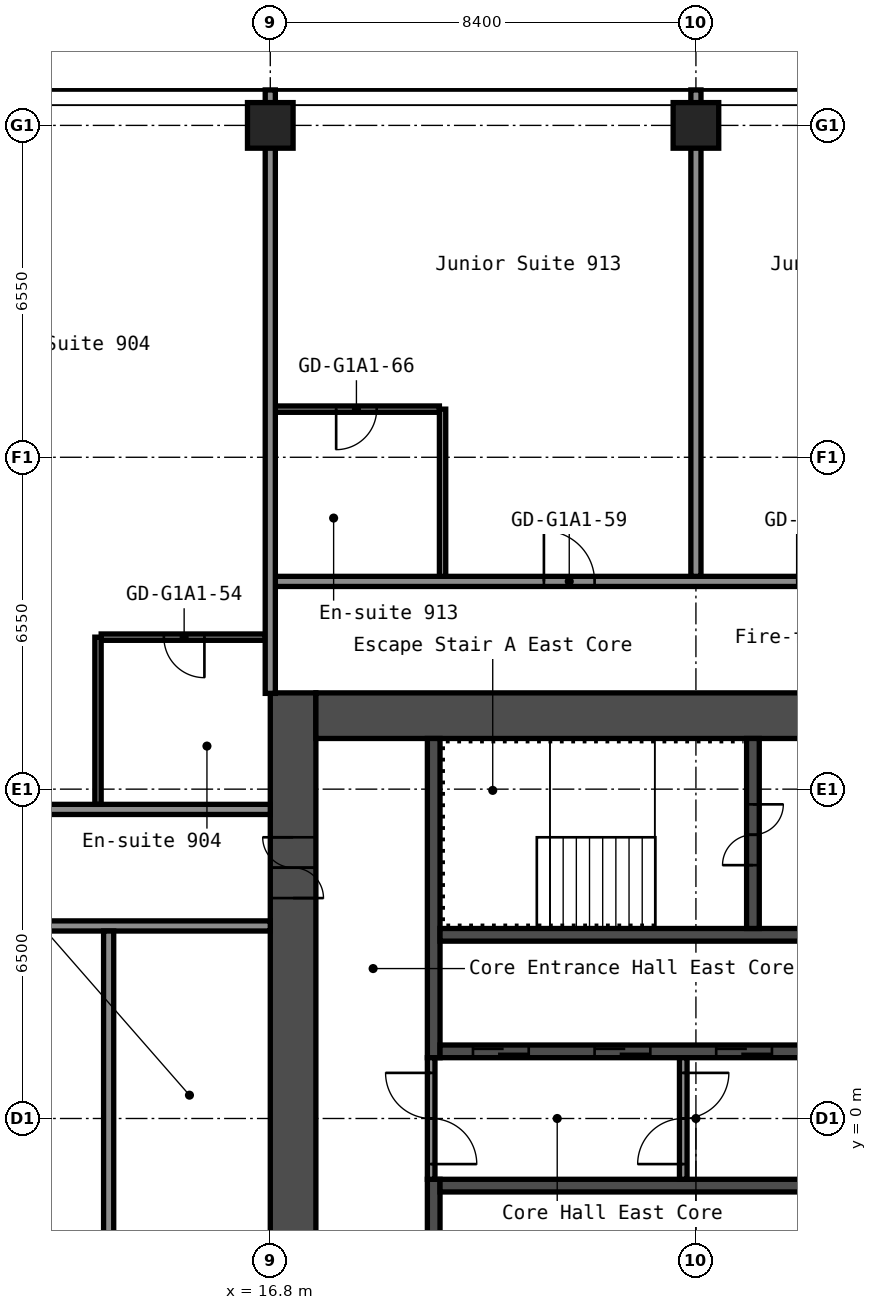
"""IFC4 building model, lengths in metres.
Left out: names, types, materials, properties, quantities, classifications, styles, units other than length and angle.
Written with IfcOpenShell. Run it as: python <this file> out.ifc"""

import sys

from ifc_helpers import new_model, si_unit, direction, frame, frame_2d, origin, origin_2d, place, context, subcontext, project, spatial, rectangle, hollow_rectangle, extrude, element, fill, save


model = new_model("IFC4")
c1 = context("Model", 3, precision=1e-05, world=origin(), true_north=direction((0.0, 1.0)))
c2 = subcontext(c1, "Body", "Model", "MODEL_VIEW")
j1 = project(units=[si_unit("LENGTHUNIT", "METRE"), si_unit("PLANEANGLEUNIT", "RADIAN")], contexts=[c1])
p1 = place(None, origin())
s1 = spatial("IfcSite", under=j1, at=p1, CompositionType="ELEMENT")
p2 = place(p1, origin())
s2 = spatial("IfcBuilding", under=s1, at=p2, CompositionType="ELEMENT")
p3 = place(p2, frame((0.0, 0.0, 35.8)))
s3 = spatial("IfcBuildingStorey", under=s2, at=p3, CompositionType="ELEMENT", Elevation=35.8)
for number, where, z_axis, x_axis in (
    (1, (16.8, 19.6, 0.0), (0.0, 0.0, 1.0), (1.0, 0.0, 0.0)),
    (2, (25.2, 19.6, 0.0), (0.0, 0.0, 1.0), (1.0, 0.0, 0.0)),
):
    element("IfcColumn", number, at=place(p3, frame(where, z_axis=z_axis, x_axis=x_axis)), inside=s3, PredefinedType="COLUMN", context=c2, shape_type="SweptSolid", body=[
        extrude(hollow_rectangle(XDim=0.9, YDim=0.9, WallThickness=0.036, at=origin_2d()), origin(), (0.0, 0.0, 1.0), 2.8),
    ])
p4 = place(p3, frame((17.25, -8.4, 0.0), z_axis=(0.0, 0.0, 1.0), x_axis=(0.0, 1.0, 0.0)))
e3 = element("IfcWall", 3, at=p4, inside=s3, PredefinedType="SHEAR", context=c2, shape_type="SweptSolid", body=[
    extrude(rectangle(XDim=16.8, YDim=0.9, at=frame_2d((8.4, 0.0))), origin(), (0.0, 0.0, 1.0), 2.8),
])
p5 = place(p4, frame((12.75, 0.0, 0.0)))
e4 = element("IfcOpeningElement", 4, at=p5, cuts=e3, PredefinedType="OPENING", context=c2, shape_type="SweptSolid", body=[
    extrude(rectangle(XDim=1.2, YDim=2.1, at=frame_2d((0.6, 1.05))), frame((0.0, 0.46, 0.0), z_axis=(0.0, -1.0, 0.0), x_axis=(1.0, 0.0, 0.0)), (0.0, 0.0, 1.0), 0.92),
])
p6 = place(p4, frame((2.85, 0.0, 0.0)))
e5 = element("IfcOpeningElement", 5, at=p6, cuts=e3, PredefinedType="OPENING", context=c2, shape_type="SweptSolid", body=[
    extrude(rectangle(XDim=1.2, YDim=2.1, at=frame_2d((0.6, 1.05))), frame((0.0, 0.46, 0.0), z_axis=(0.0, -1.0, 0.0), x_axis=(1.0, 0.0, 0.0)), (0.0, 0.0, 1.0), 0.92),
])
p7 = place(p3, frame((17.7, 7.95, 0.0), z_axis=(0.0, 0.0, 1.0), x_axis=(1.0, 0.0, 0.0)))
e6 = element("IfcWall", 6, at=p7, inside=s3, PredefinedType="SHEAR", context=c2, shape_type="SweptSolid", body=[
    extrude(rectangle(XDim=15.0, YDim=0.9, at=frame_2d((7.5, 0.0))), origin(), (0.0, 0.0, 1.0), 2.8),
])
p8 = place(p7, frame((10.4, 0.0, 0.0)))
e7 = element("IfcOpeningElement", 7, at=p8, cuts=e6, PredefinedType="OPENING", context=c2, shape_type="SweptSolid", body=[
    extrude(rectangle(XDim=1.2, YDim=2.1, at=frame_2d((0.6, 1.05))), frame((0.0, 0.46, 0.0), z_axis=(0.0, -1.0, 0.0), x_axis=(1.0, 0.0, 0.0)), (0.0, 0.0, 1.0), 0.92),
])
p9 = place(p7, frame((13.35, 0.0, 0.0)))
e8 = element("IfcOpeningElement", 8, at=p9, cuts=e6, PredefinedType="OPENING", context=c2, shape_type="SweptSolid", body=[
    extrude(rectangle(XDim=0.9, YDim=2.1, at=frame_2d((0.45, 1.05))), frame((0.0, 0.46, 0.0), z_axis=(0.0, -1.0, 0.0), x_axis=(1.0, 0.0, 0.0)), (0.0, 0.0, 1.0), 0.92),
])
p10 = place(p3, frame((20.025, 1.2, 0.0), z_axis=(0.0, 0.0, 1.0), x_axis=(0.0, 1.0, 0.0)))
e9 = element("IfcWall", 9, at=p10, inside=s3, PredefinedType="SHEAR", context=c2, shape_type="SweptSolid", body=[
    extrude(rectangle(XDim=6.3, YDim=0.25, at=frame_2d((3.15, 0.0))), origin(), (0.0, 0.0, 1.0), 2.8),
])
p11 = place(p3, frame((20.025, -7.5, 0.0), z_axis=(0.0, 0.0, 1.0), x_axis=(0.0, 1.0, 0.0)))
e10 = element("IfcWall", 10, at=p11, inside=s3, PredefinedType="SHEAR", context=c2, shape_type="SweptSolid", body=[
    extrude(rectangle(XDim=6.3, YDim=0.25, at=frame_2d((3.15, 0.0))), origin(), (0.0, 0.0, 1.0), 2.8),
])
p12 = place(p11, frame((2.4, 0.0, 0.0)))
e11 = element("IfcOpeningElement", 11, at=p12, cuts=e10, PredefinedType="OPENING", context=c2, shape_type="SweptSolid", body=[
    extrude(rectangle(XDim=1.0, YDim=2.1, at=frame_2d((0.5, 1.05))), frame((0.0, 0.135, 0.0), z_axis=(0.0, -1.0, 0.0), x_axis=(1.0, 0.0, 0.0)), (0.0, 0.0, 1.0), 0.27),
])
p13 = place(p3, frame((20.15, 1.325, 0.0), z_axis=(0.0, 0.0, 1.0), x_axis=(1.0, 0.0, 0.0)))
e12 = element("IfcWall", 12, at=p13, inside=s3, PredefinedType="SHEAR", context=c2, shape_type="SweptSolid", body=[
    extrude(rectangle(XDim=7.5, YDim=0.25, at=frame_2d((3.75, 0.0))), origin(), (0.0, 0.0, 1.0), 2.8),
])
p14 = place(p13, frame((0.65, 0.0, 0.0)))
e13 = element("IfcOpeningElement", 13, at=p14, cuts=e12, PredefinedType="OPENING", context=c2, shape_type="SweptSolid", body=[
    extrude(rectangle(XDim=1.1, YDim=2.1, at=frame_2d((0.55, 1.05))), frame((0.0, 0.135, 0.0), z_axis=(0.0, -1.0, 0.0), x_axis=(1.0, 0.0, 0.0)), (0.0, 0.0, 1.0), 0.27),
])
p15 = place(p13, frame((3.05, 0.0, 0.0)))
e14 = element("IfcOpeningElement", 14, at=p15, cuts=e12, PredefinedType="OPENING", context=c2, shape_type="SweptSolid", body=[
    extrude(rectangle(XDim=1.1, YDim=2.1, at=frame_2d((0.55, 1.05))), frame((0.0, 0.135, 0.0), z_axis=(0.0, -1.0, 0.0), x_axis=(1.0, 0.0, 0.0)), (0.0, 0.0, 1.0), 0.27),
])
p16 = place(p13, frame((5.45, 0.0, 0.0)))
e15 = element("IfcOpeningElement", 15, at=p16, cuts=e12, PredefinedType="OPENING", context=c2, shape_type="SweptSolid", body=[
    extrude(rectangle(XDim=1.1, YDim=2.1, at=frame_2d((0.55, 1.05))), frame((0.0, 0.135, 0.0), z_axis=(0.0, -1.0, 0.0), x_axis=(1.0, 0.0, 0.0)), (0.0, 0.0, 1.0), 0.27),
])
p17 = place(p3, frame((20.15, 3.625, 0.0), z_axis=(0.0, 0.0, 1.0), x_axis=(1.0, 0.0, 0.0)))
e16 = element("IfcWall", 16, at=p17, inside=s3, PredefinedType="SHEAR", context=c2, shape_type="SweptSolid", body=[
    extrude(rectangle(XDim=7.5, YDim=0.25, at=frame_2d((3.75, 0.0))), origin(), (0.0, 0.0, 1.0), 2.8),
])
p18 = place(p3, frame((26.325, 3.75, 0.0), z_axis=(0.0, 0.0, 1.0), x_axis=(0.0, 1.0, 0.0)))
e17 = element("IfcWall", 17, at=p18, inside=s3, PredefinedType="SHEAR", context=c2, shape_type="SweptSolid", body=[
    extrude(rectangle(XDim=3.75, YDim=0.25, at=frame_2d((1.875, 0.0))), origin(), (0.0, 0.0, 1.0), 2.8),
])
p19 = place(p18, frame((1.25, 0.0, 0.0)))
e18 = element("IfcOpeningElement", 18, at=p19, cuts=e17, PredefinedType="OPENING", context=c2, shape_type="SweptSolid", body=[
    extrude(rectangle(XDim=1.2, YDim=2.1, at=frame_2d((0.6, 1.05))), frame((0.0, 0.135, 0.0), z_axis=(0.0, -1.0, 0.0), x_axis=(1.0, 0.0, 0.0)), (0.0, 0.0, 1.0), 0.27),
])
p20 = place(p3, frame((20.15, -1.325, 0.0), z_axis=(0.0, 0.0, 1.0), x_axis=(1.0, 0.0, 0.0)))
e19 = element("IfcWall", 19, at=p20, inside=s3, PredefinedType="SHEAR", context=c2, shape_type="SweptSolid", body=[
    extrude(rectangle(XDim=7.5, YDim=0.25, at=frame_2d((3.75, 0.0))), origin(), (0.0, 0.0, 1.0), 2.8),
])
p21 = place(p3, frame((19.975, -1.2, 0.0), z_axis=(0.0, 0.0, 1.0), x_axis=(0.0, 1.0, 0.0)))
e20 = element("IfcWall", 20, at=p21, inside=s3, PredefinedType="PARTITIONING", context=c2, shape_type="SweptSolid", body=[
    extrude(rectangle(XDim=2.4, YDim=0.15, at=frame_2d((1.2, 0.0))), origin(), (0.0, 0.0, 1.0), 2.8),
])
p22 = place(p21, frame((0.3, 0.0, 0.0)))
e21 = element("IfcOpeningElement", 21, at=p22, cuts=e20, PredefinedType="OPENING", context=c2, shape_type="SweptSolid", body=[
    extrude(rectangle(XDim=1.8, YDim=2.1, at=frame_2d((0.9, 1.05))), frame((0.0, 0.085, 0.0), z_axis=(0.0, -1.0, 0.0), x_axis=(1.0, 0.0, 0.0)), (0.0, 0.0, 1.0), 0.17),
])
p23 = place(p3, frame((24.95, -1.2, 0.0), z_axis=(0.0, 0.0, 1.0), x_axis=(0.0, 1.0, 0.0)))
e22 = element("IfcWall", 22, at=p23, inside=s3, PredefinedType="PARTITIONING", context=c2, shape_type="SweptSolid", body=[
    extrude(rectangle(XDim=2.4, YDim=0.15, at=frame_2d((1.2, 0.0))), origin(), (0.0, 0.0, 1.0), 2.8),
])
p24 = place(p23, frame((0.3, 0.0, 0.0)))
e23 = element("IfcOpeningElement", 23, at=p24, cuts=e22, PredefinedType="OPENING", context=c2, shape_type="SweptSolid", body=[
    extrude(rectangle(XDim=1.8, YDim=2.1, at=frame_2d((0.9, 1.05))), frame((0.0, 0.085, 0.0), z_axis=(0.0, -1.0, 0.0), x_axis=(1.0, 0.0, 0.0)), (0.0, 0.0, 1.0), 0.17),
])
p25 = place(p3, frame((-16.8, 3.8, 0.0), z_axis=(0.0, 0.0, 1.0), x_axis=(1.0, 0.0, 0.0)))
e24 = element("IfcWall", 24, at=p25, inside=s3, PredefinedType="PARTITIONING", context=c2, shape_type="SweptSolid", body=[
    extrude(rectangle(XDim=33.6, YDim=0.2, at=frame_2d((16.8, 0.0))), origin(), (0.0, 0.0, 1.0), 2.8),
])
p26 = place(p25, frame((1.9, 0.0, 0.0)))
e25 = element("IfcOpeningElement", 25, at=p26, cuts=e24, PredefinedType="OPENING", context=c2, shape_type="SweptSolid", body=[
    extrude(rectangle(XDim=0.9, YDim=2.1, at=frame_2d((0.45, 1.05))), frame((0.0, 0.11, 0.0), z_axis=(0.0, -1.0, 0.0), x_axis=(1.0, 0.0, 0.0)), (0.0, 0.0, 1.0), 0.22),
])
p27 = place(p25, frame((6.1, 0.0, 0.0)))
e26 = element("IfcOpeningElement", 26, at=p27, cuts=e24, PredefinedType="OPENING", context=c2, shape_type="SweptSolid", body=[
    extrude(rectangle(XDim=0.9, YDim=2.1, at=frame_2d((0.45, 1.05))), frame((0.0, 0.11, 0.0), z_axis=(0.0, -1.0, 0.0), x_axis=(1.0, 0.0, 0.0)), (0.0, 0.0, 1.0), 0.22),
])
p28 = place(p25, frame((18.115, 0.0, 0.0)))
e27 = element("IfcOpeningElement", 27, at=p28, cuts=e24, PredefinedType="OPENING", context=c2, shape_type="SweptSolid", body=[
    extrude(rectangle(XDim=0.9, YDim=2.1, at=frame_2d((0.45, 1.05))), frame((0.0, 0.11, 0.0), z_axis=(0.0, -1.0, 0.0), x_axis=(1.0, 0.0, 0.0)), (0.0, 0.0, 1.0), 0.22),
])
p29 = place(p25, frame((22.315, 0.0, 0.0)))
e28 = element("IfcOpeningElement", 28, at=p29, cuts=e24, PredefinedType="OPENING", context=c2, shape_type="SweptSolid", body=[
    extrude(rectangle(XDim=0.9, YDim=2.1, at=frame_2d((0.45, 1.05))), frame((0.0, 0.11, 0.0), z_axis=(0.0, -1.0, 0.0), x_axis=(1.0, 0.0, 0.0)), (0.0, 0.0, 1.0), 0.22),
])
p30 = place(p3, frame((-16.8, 6.1, 0.0), z_axis=(0.0, 0.0, 1.0), x_axis=(1.0, 0.0, 0.0)))
e29 = element("IfcWall", 29, at=p30, inside=s3, PredefinedType="PARTITIONING", context=c2, shape_type="SweptSolid", body=[
    extrude(rectangle(XDim=33.6, YDim=0.2, at=frame_2d((16.8, 0.0))), origin(), (0.0, 0.0, 1.0), 2.8),
])
p31 = place(p30, frame((1.9, 0.0, 0.0)))
e30 = element("IfcOpeningElement", 30, at=p31, cuts=e29, PredefinedType="OPENING", context=c2, shape_type="SweptSolid", body=[
    extrude(rectangle(XDim=1.0, YDim=2.1, at=frame_2d((0.5, 1.05))), frame((0.0, 0.11, 0.0), z_axis=(0.0, -1.0, 0.0), x_axis=(1.0, 0.0, 0.0)), (0.0, 0.0, 1.0), 0.22),
])
p32 = place(p30, frame((9.63, 0.0, 0.0)))
e31 = element("IfcOpeningElement", 31, at=p32, cuts=e29, PredefinedType="OPENING", context=c2, shape_type="SweptSolid", body=[
    extrude(rectangle(XDim=0.9, YDim=2.1, at=frame_2d((0.45, 1.05))), frame((0.0, 0.11, 0.0), z_axis=(0.0, -1.0, 0.0), x_axis=(1.0, 0.0, 0.0)), (0.0, 0.0, 1.0), 0.22),
])
p33 = place(p30, frame((13.83, 0.0, 0.0)))
e32 = element("IfcOpeningElement", 32, at=p33, cuts=e29, PredefinedType="OPENING", context=c2, shape_type="SweptSolid", body=[
    extrude(rectangle(XDim=0.9, YDim=2.1, at=frame_2d((0.45, 1.05))), frame((0.0, 0.11, 0.0), z_axis=(0.0, -1.0, 0.0), x_axis=(1.0, 0.0, 0.0)), (0.0, 0.0, 1.0), 0.22),
])
p34 = place(p30, frame((18.785, 0.0, 0.0)))
e33 = element("IfcOpeningElement", 33, at=p34, cuts=e29, PredefinedType="OPENING", context=c2, shape_type="SweptSolid", body=[
    extrude(rectangle(XDim=0.9, YDim=2.1, at=frame_2d((0.45, 1.05))), frame((0.0, 0.11, 0.0), z_axis=(0.0, -1.0, 0.0), x_axis=(1.0, 0.0, 0.0)), (0.0, 0.0, 1.0), 0.22),
])
p35 = place(p30, frame((22.985, 0.0, 0.0)))
e34 = element("IfcOpeningElement", 34, at=p35, cuts=e29, PredefinedType="OPENING", context=c2, shape_type="SweptSolid", body=[
    extrude(rectangle(XDim=0.9, YDim=2.1, at=frame_2d((0.45, 1.05))), frame((0.0, 0.11, 0.0), z_axis=(0.0, -1.0, 0.0), x_axis=(1.0, 0.0, 0.0)), (0.0, 0.0, 1.0), 0.22),
])
p36 = place(p30, frame((27.2, 0.0, 0.0)))
e35 = element("IfcOpeningElement", 35, at=p36, cuts=e29, PredefinedType="OPENING", context=c2, shape_type="SweptSolid", body=[
    extrude(rectangle(XDim=1.0, YDim=2.1, at=frame_2d((0.5, 1.05))), frame((0.0, 0.11, 0.0), z_axis=(0.0, -1.0, 0.0), x_axis=(1.0, 0.0, 0.0)), (0.0, 0.0, 1.0), 0.22),
])
p37 = place(p3, frame((13.462, 9.5, 0.0), z_axis=(0.0, 0.0, 1.0), x_axis=(1.0, 0.0, 0.0)))
e36 = element("IfcWall", 36, at=p37, inside=s3, PredefinedType="PARTITIONING", context=c2, shape_type="SweptSolid", body=[
    extrude(rectangle(XDim=3.238, YDim=0.125, at=frame_2d((1.619, 0.0))), origin(), (0.0, 0.0, 1.0), 2.8),
])
p38 = place(p37, frame((1.238, 0.0, 0.0)))
e37 = element("IfcOpeningElement", 37, at=p38, cuts=e36, PredefinedType="OPENING", context=c2, shape_type="SweptSolid", body=[
    extrude(rectangle(XDim=0.8, YDim=2.1, at=frame_2d((0.4, 1.05))), frame((0.0, 0.073, 0.0), z_axis=(0.0, -1.0, 0.0), x_axis=(1.0, 0.0, 0.0)), (0.0, 0.0, 1.0), 0.145),
])
p39 = place(p3, frame((16.8, 10.6, 0.0), z_axis=(0.0, 0.0, 1.0), x_axis=(1.0, 0.0, 0.0)))
e38 = element("IfcWall", 38, at=p39, inside=s3, PredefinedType="PARTITIONING", context=c2, shape_type="SweptSolid", body=[
    extrude(rectangle(XDim=34.3, YDim=0.2, at=frame_2d((17.15, 0.0))), origin(), (0.0, 0.0, 1.0), 2.8),
])
p40 = place(p39, frame((5.4, 0.0, 0.0)))
e39 = element("IfcOpeningElement", 39, at=p40, cuts=e38, PredefinedType="OPENING", context=c2, shape_type="SweptSolid", body=[
    extrude(rectangle(XDim=1.0, YDim=2.1, at=frame_2d((0.5, 1.05))), frame((0.0, 0.11, 0.0), z_axis=(0.0, -1.0, 0.0), x_axis=(1.0, 0.0, 0.0)), (0.0, 0.0, 1.0), 0.22),
])
p41 = place(p39, frame((10.4, 0.0, 0.0)))
e40 = element("IfcOpeningElement", 40, at=p41, cuts=e38, PredefinedType="OPENING", context=c2, shape_type="SweptSolid", body=[
    extrude(rectangle(XDim=1.0, YDim=2.1, at=frame_2d((0.5, 1.05))), frame((0.0, 0.11, 0.0), z_axis=(0.0, -1.0, 0.0), x_axis=(1.0, 0.0, 0.0)), (0.0, 0.0, 1.0), 0.22),
])
p42 = place(p39, frame((22.2, 0.0, 0.0)))
e41 = element("IfcOpeningElement", 41, at=p42, cuts=e38, PredefinedType="OPENING", context=c2, shape_type="SweptSolid", body=[
    extrude(rectangle(XDim=1.0, YDim=2.1, at=frame_2d((0.5, 1.05))), frame((0.0, 0.11, 0.0), z_axis=(0.0, -1.0, 0.0), x_axis=(1.0, 0.0, 0.0)), (0.0, 0.0, 1.0), 0.22),
])
p43 = place(p39, frame((27.4, 0.0, 0.0)))
e42 = element("IfcOpeningElement", 42, at=p43, cuts=e38, PredefinedType="OPENING", context=c2, shape_type="SweptSolid", body=[
    extrude(rectangle(XDim=1.0, YDim=2.1, at=frame_2d((0.5, 1.05))), frame((0.0, 0.11, 0.0), z_axis=(0.0, -1.0, 0.0), x_axis=(1.0, 0.0, 0.0)), (0.0, 0.0, 1.0), 0.22),
])
p44 = place(p3, frame((16.9, 14.0, 0.0), z_axis=(0.0, 0.0, 1.0), x_axis=(1.0, 0.0, 0.0)))
e43 = element("IfcWall", 43, at=p44, inside=s3, PredefinedType="PARTITIONING", context=c2, shape_type="SweptSolid", body=[
    extrude(rectangle(XDim=3.238, YDim=0.125, at=frame_2d((1.619, 0.0))), origin(), (0.0, 0.0, 1.0), 2.8),
])
p45 = place(p44, frame((1.2, 0.0, 0.0)))
e44 = element("IfcOpeningElement", 44, at=p45, cuts=e43, PredefinedType="OPENING", context=c2, shape_type="SweptSolid", body=[
    extrude(rectangle(XDim=0.8, YDim=2.1, at=frame_2d((0.4, 1.05))), frame((0.0, 0.073, 0.0), z_axis=(0.0, -1.0, 0.0), x_axis=(1.0, 0.0, 0.0)), (0.0, 0.0, 1.0), 0.145),
])
p46 = place(p3, frame((13.4, 6.2, 0.0), z_axis=(0.0, 0.0, 1.0), x_axis=(0.0, 1.0, 0.0)))
e45 = element("IfcWall", 45, at=p46, inside=s3, PredefinedType="PARTITIONING", context=c2, shape_type="SweptSolid", body=[
    extrude(rectangle(XDim=3.3, YDim=0.125, at=frame_2d((1.65, 0.0))), origin(), (0.0, 0.0, 1.0), 2.8),
])
p47 = place(p3, frame((13.61, -3.7, 0.0), z_axis=(0.0, 0.0, 1.0), x_axis=(0.0, 1.0, 0.0)))
e46 = element("IfcWall", 46, at=p47, inside=s3, PredefinedType="PARTITIONING", context=c2, shape_type="SweptSolid", body=[
    extrude(rectangle(XDim=7.4, YDim=0.2, at=frame_2d((3.7, 0.0))), origin(), (0.0, 0.0, 1.0), 2.8),
])
p48 = place(p3, frame((16.8, 8.39, 0.0), z_axis=(0.0, 0.0, 1.0), x_axis=(0.0, 1.0, 0.0)))
e47 = element("IfcWall", 47, at=p48, inside=s3, PredefinedType="PARTITIONING", context=c2, shape_type="SweptSolid", body=[
    extrude(rectangle(XDim=11.91, YDim=0.2, at=frame_2d((5.955, 0.0))), origin(), (0.0, 0.0, 1.0), 2.8),
])
p49 = place(p3, frame((20.2, 10.7, 0.0), z_axis=(0.0, 0.0, 1.0), x_axis=(0.0, 1.0, 0.0)))
e48 = element("IfcWall", 48, at=p49, inside=s3, PredefinedType="PARTITIONING", context=c2, shape_type="SweptSolid", body=[
    extrude(rectangle(XDim=3.3, YDim=0.125, at=frame_2d((1.65, 0.0))), origin(), (0.0, 0.0, 1.0), 2.8),
])
p50 = place(p3, frame((25.2, 10.7, 0.0), z_axis=(0.0, 0.0, 1.0), x_axis=(0.0, 1.0, 0.0)))
e49 = element("IfcWall", 49, at=p50, inside=s3, PredefinedType="PARTITIONING", context=c2, shape_type="SweptSolid", body=[
    extrude(rectangle(XDim=9.6, YDim=0.2, at=frame_2d((4.8, 0.0))), origin(), (0.0, 0.0, 1.0), 2.8),
])
p51 = place(p5, origin())
e50 = element("IfcDoor", 50, at=p51, inside=s3, OperationType="DOUBLE_DOOR_SINGLE_SWING", PredefinedType="DOOR", context=c2, shape_type="SweptSolid", body=[
    extrude(rectangle(XDim=1.2, YDim=2.1, at=frame_2d((0.6, 1.05))), frame((0.0, 0.025, 0.0), z_axis=(0.0, -1.0, 0.0), x_axis=(1.0, 0.0, 0.0)), (0.0, 0.0, 1.0), 0.05),
])
fill(e4, e50)
p52 = place(p19, origin())
e51 = element("IfcDoor", 51, at=p52, inside=s3, OperationType="DOUBLE_DOOR_SINGLE_SWING", PredefinedType="DOOR", context=c2, shape_type="SweptSolid", body=[
    extrude(rectangle(XDim=1.2, YDim=2.1, at=frame_2d((0.6, 1.05))), frame((0.0, 0.025, 0.0), z_axis=(0.0, -1.0, 0.0), x_axis=(1.0, 0.0, 0.0)), (0.0, 0.0, 1.0), 0.05),
])
fill(e18, e51)
p53 = place(p22, origin())
e52 = element("IfcDoor", 52, at=p53, inside=s3, OperationType="DOUBLE_DOOR_SINGLE_SWING", PredefinedType="DOOR", context=c2, shape_type="SweptSolid", body=[
    extrude(rectangle(XDim=1.8, YDim=2.1, at=frame_2d((0.9, 1.05))), frame((0.0, 0.025, 0.0), z_axis=(0.0, -1.0, 0.0), x_axis=(1.0, 0.0, 0.0)), (0.0, 0.0, 1.0), 0.05),
])
fill(e21, e52)
p54 = place(p24, origin())
e53 = element("IfcDoor", 53, at=p54, inside=s3, OperationType="DOUBLE_DOOR_SINGLE_SWING", PredefinedType="DOOR", context=c2, shape_type="SweptSolid", body=[
    extrude(rectangle(XDim=1.8, YDim=2.1, at=frame_2d((0.9, 1.05))), frame((0.0, 0.025, 0.0), z_axis=(0.0, -1.0, 0.0), x_axis=(1.0, 0.0, 0.0)), (0.0, 0.0, 1.0), 0.05),
])
fill(e23, e53)
p55 = place(p14, origin())
e54 = element("IfcDoor", 54, at=p55, inside=s3, OperationType="DOUBLE_DOOR_SLIDING", PredefinedType="DOOR", context=c2, shape_type="SweptSolid", body=[
    extrude(rectangle(XDim=1.1, YDim=2.1, at=frame_2d((0.55, 1.05))), frame((0.0, 0.025, 0.0), z_axis=(0.0, -1.0, 0.0), x_axis=(1.0, 0.0, 0.0)), (0.0, 0.0, 1.0), 0.05),
])
fill(e13, e54)
p56 = place(p15, origin())
e55 = element("IfcDoor", 55, at=p56, inside=s3, OperationType="DOUBLE_DOOR_SLIDING", PredefinedType="DOOR", context=c2, shape_type="SweptSolid", body=[
    extrude(rectangle(XDim=1.1, YDim=2.1, at=frame_2d((0.55, 1.05))), frame((0.0, 0.025, 0.0), z_axis=(0.0, -1.0, 0.0), x_axis=(1.0, 0.0, 0.0)), (0.0, 0.0, 1.0), 0.05),
])
fill(e14, e55)
p57 = place(p16, origin())
e56 = element("IfcDoor", 56, at=p57, inside=s3, OperationType="DOUBLE_DOOR_SLIDING", PredefinedType="DOOR", context=c2, shape_type="SweptSolid", body=[
    extrude(rectangle(XDim=1.1, YDim=2.1, at=frame_2d((0.55, 1.05))), frame((0.0, 0.025, 0.0), z_axis=(0.0, -1.0, 0.0), x_axis=(1.0, 0.0, 0.0)), (0.0, 0.0, 1.0), 0.05),
])
fill(e15, e56)
p58 = place(p38, origin())
e57 = element("IfcDoor", 57, at=p58, inside=s3, OperationType="SINGLE_SWING_RIGHT", PredefinedType="DOOR", context=c2, shape_type="SweptSolid", body=[
    extrude(rectangle(XDim=0.8, YDim=2.1, at=frame_2d((0.4, 1.05))), frame((0.0, 0.025, 0.0), z_axis=(0.0, -1.0, 0.0), x_axis=(1.0, 0.0, 0.0)), (0.0, 0.0, 1.0), 0.05),
])
fill(e37, e57)
p59 = place(p40, origin())
e58 = element("IfcDoor", 58, at=p59, inside=s3, OperationType="SINGLE_SWING_RIGHT", PredefinedType="DOOR", context=c2, shape_type="SweptSolid", body=[
    extrude(rectangle(XDim=1.0, YDim=2.1, at=frame_2d((0.5, 1.05))), frame((0.0, 0.025, 0.0), z_axis=(0.0, -1.0, 0.0), x_axis=(1.0, 0.0, 0.0)), (0.0, 0.0, 1.0), 0.05),
])
fill(e39, e58)
p60 = place(p41, origin())
e59 = element("IfcDoor", 59, at=p60, inside=s3, OperationType="SINGLE_SWING_RIGHT", PredefinedType="DOOR", context=c2, shape_type="SweptSolid", body=[
    extrude(rectangle(XDim=1.0, YDim=2.1, at=frame_2d((0.5, 1.05))), frame((0.0, 0.025, 0.0), z_axis=(0.0, -1.0, 0.0), x_axis=(1.0, 0.0, 0.0)), (0.0, 0.0, 1.0), 0.05),
])
fill(e40, e59)
p61 = place(p45, origin())
e60 = element("IfcDoor", 60, at=p61, inside=s3, OperationType="SINGLE_SWING_LEFT", PredefinedType="DOOR", context=c2, shape_type="SweptSolid", body=[
    extrude(rectangle(XDim=0.8, YDim=2.1, at=frame_2d((0.4, 1.05))), frame((0.0, 0.025, 0.0), z_axis=(0.0, -1.0, 0.0), x_axis=(1.0, 0.0, 0.0)), (0.0, 0.0, 1.0), 0.05),
])
fill(e44, e60)
save(model, sys.argv[1])
